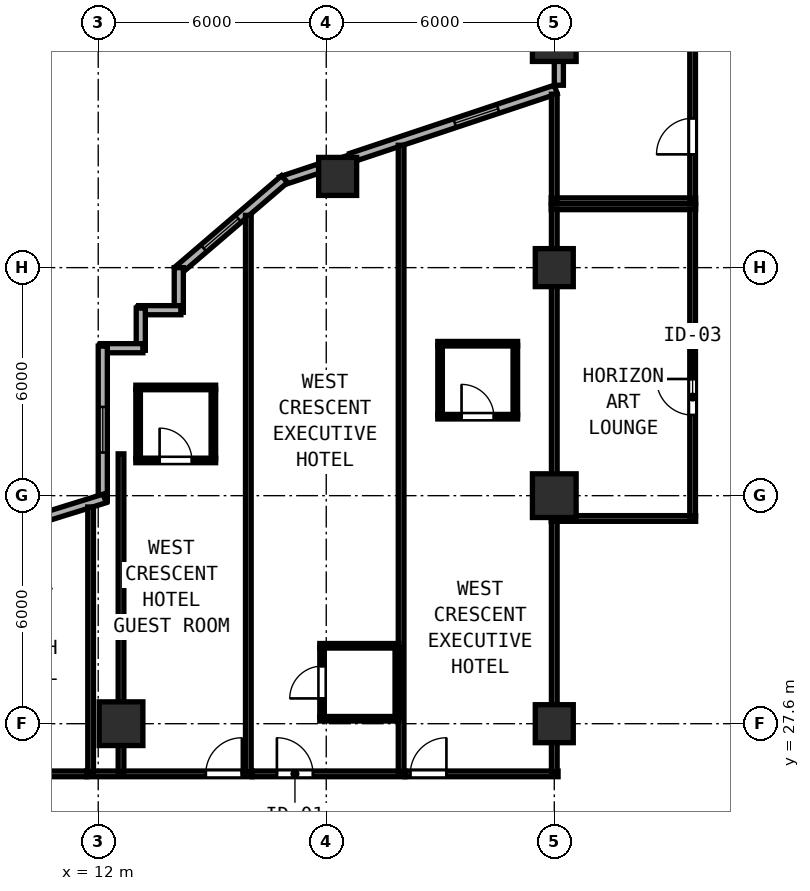
"""IFC4 building model, lengths in metres.
Left out: names, types, materials, properties, quantities, classifications, styles, units other than length and angle.
Written with IfcOpenShell. Run it as: python <this file> out.ifc"""

import sys

from ifc_helpers import new_model, si_unit, direction, frame, frame_2d, origin, origin_2d, place, context, subcontext, project, spatial, rectangle, hollow_rectangle, extrude, element, fill, save


model = new_model("IFC4")
c1 = context("Model", 3, precision=1e-05, world=origin(), true_north=direction((0.0, 1.0)))
c2 = subcontext(c1, "Body", "Model", "MODEL_VIEW")
j1 = project(units=[si_unit("LENGTHUNIT", "METRE"), si_unit("PLANEANGLEUNIT", "RADIAN")], contexts=[c1])
p1 = place(None, origin())
s1 = spatial("IfcSite", under=j1, at=p1, CompositionType="ELEMENT")
p2 = place(p1, origin())
s2 = spatial("IfcBuilding", under=s1, at=p2, CompositionType="ELEMENT")
p3 = place(p2, frame((0.0, 0.0, 47.6)))
s3 = spatial("IfcBuildingStorey", under=s2, at=p3, CompositionType="ELEMENT", Elevation=47.6)
for number, where, z_axis, x_axis in (
    (1, (24.0, 33.6, 0.0), (0.0, 0.0, 1.0), (1.0, 0.0, 0.0)),
    (2, (24.0, 45.6, 0.0), (0.0, 0.0, 1.0), (1.0, 0.0, 0.0)),
    (3, (12.6, 27.6, 0.0), (0.0, 0.0, 1.0), (1.0, 0.0, 0.0)),
):
    element("IfcColumn", number, at=place(p3, frame(where, z_axis=z_axis, x_axis=x_axis)), inside=s3, PredefinedType="COLUMN", context=c2, shape_type="SweptSolid", body=[
        extrude(hollow_rectangle(XDim=1.15, YDim=1.15, WallThickness=0.042, at=origin_2d()), origin(), (0.0, 0.0, 1.0), 3.8),
    ])
for number, where, z_axis, x_axis in (
    (4, (24.0, 27.6, 0.0), (0.0, 0.0, 1.0), (1.0, 0.0, 0.0)),
    (5, (24.0, 39.6, 0.0), (0.0, 0.0, 1.0), (1.0, 0.0, 0.0)),
    (6, (18.3, 42.0, 0.0), (0.0, 0.0, 1.0), (1.0, 0.0, 0.0)),
):
    element("IfcColumn", number, at=place(p3, frame(where, z_axis=z_axis, x_axis=x_axis)), inside=s3, PredefinedType="COLUMN", context=c2, shape_type="SweptSolid", body=[
        extrude(hollow_rectangle(XDim=1.0, YDim=1.0, WallThickness=0.038, at=origin_2d()), origin(), (0.0, 0.0, 1.0), 3.8),
    ])
p4 = place(p3, frame((24.12, 45.033, 0.0), z_axis=(0.0, 0.0, 1.0), x_axis=(0.0, -1.0, 0.0)))
e7 = element("IfcWall", 7, at=p4, inside=s3, PredefinedType="SOLIDWALL", context=c2, shape_type="SweptSolid", body=[
    extrude(rectangle(XDim=0.635, YDim=0.24, at=frame_2d((0.317, 0.0))), origin(), (0.0, 0.0, 1.0), 3.097),
])
p5 = place(p3, frame((24.039, 44.287, 0.0), z_axis=(0.0, 0.0, 1.0), x_axis=(-0.948678995954, -0.316240672014, 0.0)))
e8 = element("IfcWall", 8, at=p5, inside=s3, PredefinedType="SOLIDWALL", context=c2, shape_type="SweptSolid", body=[
    extrude(rectangle(XDim=5.675, YDim=0.24, at=frame_2d((2.837, 0.0))), origin(), (0.0, 0.0, 1.0), 3.097),
])
p6 = place(p5, frame((1.6, 0.0, 0.85)))
e9 = element("IfcOpeningElement", 9, at=p6, cuts=e8, PredefinedType="OPENING", context=c2, shape_type="SweptSolid", body=[
    extrude(rectangle(XDim=1.2, YDim=1.85, at=frame_2d((0.6, 0.925))), frame((0.0, 0.13, 0.0), z_axis=(0.0, -1.0, 0.0), x_axis=(1.0, 0.0, 0.0)), (0.0, 0.0, 1.0), 0.26),
])
p7 = place(p3, frame((17.808, 42.209, 0.0), z_axis=(0.0, 0.0, 1.0), x_axis=(-0.948706457285, -0.316158279832, 0.0)))
e10 = element("IfcWall", 10, at=p7, inside=s3, PredefinedType="SOLIDWALL", context=c2, shape_type="SweptSolid", body=[
    extrude(rectangle(XDim=1.054, YDim=0.24, at=frame_2d((0.527, 0.0))), origin(), (0.0, 0.0, 1.0), 3.6),
])
p8 = place(p3, frame((16.902, 41.929, 0.0), z_axis=(0.0, 0.0, 1.0), x_axis=(-0.759275136126, -0.650769750112, 0.0)))
e11 = element("IfcWall", 11, at=p8, inside=s3, PredefinedType="SOLIDWALL", context=c2, shape_type="SweptSolid", body=[
    extrude(rectangle(XDim=3.719, YDim=0.24, at=frame_2d((1.86, 0.0))), origin(), (0.0, 0.0, 1.0), 3.6),
])
p9 = place(p8, frame((1.6, 0.0, 0.85)))
e12 = element("IfcOpeningElement", 12, at=p9, cuts=e11, PredefinedType="OPENING", context=c2, shape_type="SweptSolid", body=[
    extrude(rectangle(XDim=1.2, YDim=1.85, at=frame_2d((0.6, 0.925))), frame((0.0, 0.13, 0.0), z_axis=(0.0, -1.0, 0.0), x_axis=(1.0, 0.0, 0.0)), (0.0, 0.0, 1.0), 0.26),
])
p10 = place(p3, frame((14.12, 39.6, 0.0), z_axis=(0.0, 0.0, 1.0), x_axis=(0.0, -1.0, 0.0)))
e13 = element("IfcWall", 13, at=p10, inside=s3, PredefinedType="SOLIDWALL", context=c2, shape_type="SweptSolid", body=[
    extrude(rectangle(XDim=1.175, YDim=0.24, at=frame_2d((0.587, 0.0))), origin(), (0.0, 0.0, 1.0), 3.6),
])
p11 = place(p3, frame((14.175, 38.48, 0.0), z_axis=(0.0, 0.0, 1.0), x_axis=(-1.0, 0.0, 0.0)))
e14 = element("IfcWall", 14, at=p11, inside=s3, PredefinedType="SOLIDWALL", context=c2, shape_type="SweptSolid", body=[
    extrude(rectangle(XDim=1.11, YDim=0.24, at=frame_2d((0.555, 0.0))), origin(), (0.0, 0.0, 1.0), 3.6),
])
p12 = place(p3, frame((13.12, 38.535, 0.0), z_axis=(0.0, 0.0, 1.0), x_axis=(0.0, -1.0, 0.0)))
e15 = element("IfcWall", 15, at=p12, inside=s3, PredefinedType="SOLIDWALL", context=c2, shape_type="SweptSolid", body=[
    extrude(rectangle(XDim=1.11, YDim=0.24, at=frame_2d((0.555, 0.0))), origin(), (0.0, 0.0, 1.0), 3.6),
])
p13 = place(p3, frame((13.175, 37.48, 0.0), z_axis=(0.0, 0.0, 1.0), x_axis=(-1.0, 0.0, 0.0)))
e16 = element("IfcWall", 16, at=p13, inside=s3, PredefinedType="SOLIDWALL", context=c2, shape_type="SweptSolid", body=[
    extrude(rectangle(XDim=1.11, YDim=0.24, at=frame_2d((0.555, 0.0))), origin(), (0.0, 0.0, 1.0), 3.6),
])
p14 = place(p3, frame((12.12, 37.535, 0.0), z_axis=(0.0, 0.0, 1.0), x_axis=(0.0, -1.0, 0.0)))
e17 = element("IfcWall", 17, at=p14, inside=s3, PredefinedType="SOLIDWALL", context=c2, shape_type="SweptSolid", body=[
    extrude(rectangle(XDim=4.078, YDim=0.24, at=frame_2d((2.039, 0.0))), origin(), (0.0, 0.0, 1.0), 3.6),
])
p15 = place(p14, frame((1.6, 0.0, 0.85)))
e18 = element("IfcOpeningElement", 18, at=p15, cuts=e17, PredefinedType="OPENING", context=c2, shape_type="SweptSolid", body=[
    extrude(rectangle(XDim=1.2, YDim=1.85, at=frame_2d((0.6, 0.925))), frame((0.0, 0.13, 0.0), z_axis=(0.0, -1.0, 0.0), x_axis=(1.0, 0.0, 0.0)), (0.0, 0.0, 1.0), 0.26),
])
p16 = place(p3, frame((12.173, 33.528, 0.0), z_axis=(0.0, 0.0, 1.0), x_axis=(-0.954920174609, -0.296862695745, 0.0)))
e19 = element("IfcWall", 19, at=p16, inside=s3, PredefinedType="SOLIDWALL", context=c2, shape_type="SweptSolid", body=[
    extrude(rectangle(XDim=8.25, YDim=0.24, at=frame_2d((4.125, 0.0))), origin(), (0.0, 0.0, 1.0), 3.6),
])
p17 = place(p16, frame((1.6, 0.0, 0.85)))
e20 = element("IfcOpeningElement", 20, at=p17, cuts=e19, PredefinedType="OPENING", context=c2, shape_type="SweptSolid", body=[
    extrude(rectangle(XDim=1.2, YDim=1.85, at=frame_2d((0.6, 0.925))), frame((0.0, 0.13, 0.0), z_axis=(0.0, -1.0, 0.0), x_axis=(1.0, 0.0, 0.0)), (0.0, 0.0, 1.0), 0.26),
])
for number, where, z_axis, x_axis in (
    (21, (23.92, 41.2, 0.0), (0.0, 0.0, 1.0), (1.0, 0.0, 0.0)),
    (22, (23.92, 33.0, 0.0), (0.0, 0.0, 1.0), (1.0, 0.0, 0.0)),
):
    element("IfcWall", number, at=place(p3, frame(where, z_axis=z_axis, x_axis=x_axis)), inside=s3, PredefinedType="PARTITIONING", context=c2, shape_type="SweptSolid", body=[
        extrude(rectangle(XDim=3.8, YDim=0.15, at=frame_2d((1.9, 0.0))), origin(), (0.0, 0.0, 1.0), 3.6),
    ])
p18 = place(p3, frame((24.0, 33.06, 0.0), z_axis=(0.0, 0.0, 1.0), x_axis=(0.0, 1.0, 0.0)))
e23 = element("IfcWall", 23, at=p18, inside=s3, PredefinedType="PARTITIONING", context=c2, shape_type="SweptSolid", body=[
    extrude(rectangle(XDim=8.08, YDim=0.15, at=frame_2d((4.04, 0.0))), origin(), (0.0, 0.0, 1.0), 3.097),
])
p19 = place(p3, frame((27.64, 33.06, 0.0), z_axis=(0.0, 0.0, 1.0), x_axis=(0.0, 1.0, 0.0)))
e24 = element("IfcWall", 24, at=p19, inside=s3, PredefinedType="PARTITIONING", context=c2, shape_type="SweptSolid", body=[
    extrude(rectangle(XDim=8.08, YDim=0.15, at=frame_2d((4.04, 0.0))), origin(), (0.0, 0.0, 1.0), 3.6),
])
p20 = place(p19, frame((3.61, 0.0, 0.0), z_axis=(0.0, 0.0, 1.0), x_axis=(-1.0, 0.0, 0.0)))
e25 = element("IfcOpeningElement", 25, at=p20, cuts=e24, PredefinedType="OPENING", context=c2, shape_type="SweptSolid", body=[
    extrude(rectangle(XDim=0.95, YDim=2.12, at=frame_2d((0.475, 1.06))), frame((0.0, 0.085, 0.0), z_axis=(0.0, -1.0, 0.0), x_axis=(1.0, 0.0, 0.0)), (0.0, 0.0, 1.0), 0.17),
])
p21 = place(p3, frame((23.92, 41.36, 0.0), z_axis=(0.0, 0.0, 1.0), x_axis=(1.0, 0.0, 0.0)))
e26 = element("IfcWall", 26, at=p21, inside=s3, PredefinedType="PARTITIONING", context=c2, shape_type="SweptSolid", body=[
    extrude(rectangle(XDim=3.8, YDim=0.15, at=frame_2d((1.9, 0.0))), origin(), (0.0, 0.0, 1.0), 3.6),
])
p22 = place(p3, frame((24.0, 41.42, 0.0), z_axis=(0.0, 0.0, 1.0), x_axis=(0.0, 1.0, 0.0)))
e27 = element("IfcWall", 27, at=p22, inside=s3, PredefinedType="PARTITIONING", context=c2, shape_type="SweptSolid", body=[
    extrude(rectangle(XDim=2.743, YDim=0.15, at=frame_2d((1.372, 0.0))), origin(), (0.0, 0.0, 1.0), 3.097),
])
p23 = place(p3, frame((27.64, 41.42, 0.0), z_axis=(0.0, 0.0, 1.0), x_axis=(0.0, 1.0, 0.0)))
e28 = element("IfcWall", 28, at=p23, inside=s3, PredefinedType="PARTITIONING", context=c2, shape_type="SweptSolid", body=[
    extrude(rectangle(XDim=4.54, YDim=0.15, at=frame_2d((2.27, 0.0))), origin(), (0.0, 0.0, 1.0), 3.6),
])
p24 = place(p23, frame((2.11, 0.0, 0.0), z_axis=(0.0, 0.0, 1.0), x_axis=(-1.0, 0.0, 0.0)))
e29 = element("IfcOpeningElement", 29, at=p24, cuts=e28, PredefinedType="OPENING", context=c2, shape_type="SweptSolid", body=[
    extrude(rectangle(XDim=0.95, YDim=2.12, at=frame_2d((0.475, 1.06))), frame((0.0, 0.085, 0.0), z_axis=(0.0, -1.0, 0.0), x_axis=(1.0, 0.0, 0.0)), (0.0, 0.0, 1.0), 0.17),
])
p25 = place(p3, frame((11.7, 26.28, 0.0), z_axis=(0.0, 0.0, 1.0), x_axis=(1.0, 0.0, 0.0)))
e30 = element("IfcWall", 30, at=p25, inside=s3, PredefinedType="PARTITIONING", context=c2, shape_type="SweptSolid", body=[
    extrude(rectangle(XDim=4.35, YDim=0.15, at=frame_2d((2.175, 0.0))), origin(), (0.0, 0.0, 1.0), 3.6),
])
p26 = place(p25, frame((3.13, 0.0, 0.0)))
e31 = element("IfcOpeningElement", 31, at=p26, cuts=e30, PredefinedType="OPENING", context=c2, shape_type="SweptSolid", body=[
    extrude(rectangle(XDim=0.95, YDim=2.15, at=frame_2d((0.475, 1.075))), frame((0.0, 0.085, 0.0), z_axis=(0.0, -1.0, 0.0), x_axis=(1.0, 0.0, 0.0)), (0.0, 0.0, 1.0), 0.17),
])
p27 = place(p3, frame((11.8, 26.34, 0.0), z_axis=(0.0, 0.0, 1.0), x_axis=(0.0, 1.0, 0.0)))
e32 = element("IfcWall", 32, at=p27, inside=s3, PredefinedType="PARTITIONING", context=c2, shape_type="SweptSolid", body=[
    extrude(rectangle(XDim=6.962, YDim=0.15, at=frame_2d((3.481, 0.0))), origin(), (0.0, 0.0, 1.0), 3.6),
])
p28 = place(p3, frame((15.95, 26.34, 0.0), z_axis=(0.0, 0.0, 1.0), x_axis=(0.0, 1.0, 0.0)))
e33 = element("IfcWall", 33, at=p28, inside=s3, PredefinedType="PARTITIONING", context=c2, shape_type="SweptSolid", body=[
    extrude(rectangle(XDim=14.635, YDim=0.15, at=frame_2d((7.317, 0.0))), origin(), (0.0, 0.0, 1.0), 3.6),
])
p29 = place(p3, frame((12.99, 36.447, 0.0), z_axis=(0.0, 0.0, 1.0), x_axis=(1.0, 0.0, 0.0)))
e34 = element("IfcWall", 34, at=p29, inside=s3, PredefinedType="PARTITIONING", context=c2, shape_type="SweptSolid", body=[
    extrude(rectangle(XDim=2.1, YDim=0.12, at=frame_2d((1.05, 0.0))), origin(), (0.0, 0.0, 1.0), 3.6),
])
p30 = place(p3, frame((12.99, 34.527, 0.0), z_axis=(0.0, 0.0, 1.0), x_axis=(1.0, 0.0, 0.0)))
e35 = element("IfcWall", 35, at=p30, inside=s3, PredefinedType="PARTITIONING", context=c2, shape_type="SweptSolid", body=[
    extrude(rectangle(XDim=2.1, YDim=0.12, at=frame_2d((1.05, 0.0))), origin(), (0.0, 0.0, 1.0), 3.6),
])
p31 = place(p30, frame((0.625, 0.0, 0.0)))
e36 = element("IfcOpeningElement", 36, at=p31, cuts=e35, PredefinedType="OPENING", context=c2, shape_type="SweptSolid", body=[
    extrude(rectangle(XDim=0.85, YDim=2.1, at=frame_2d((0.425, 1.05))), frame((0.0, 0.07, 0.0), z_axis=(0.0, -1.0, 0.0), x_axis=(1.0, 0.0, 0.0)), (0.0, 0.0, 1.0), 0.14),
])
for number, where, z_axis, x_axis in (
    (37, (13.05, 34.572, 0.0), (0.0, 0.0, 1.0), (0.0, 1.0, 0.0)),
    (38, (15.03, 34.572, 0.0), (0.0, 0.0, 1.0), (0.0, 1.0, 0.0)),
):
    element("IfcWall", number, at=place(p3, frame(where, z_axis=z_axis, x_axis=x_axis)), inside=s3, PredefinedType="PARTITIONING", context=c2, shape_type="SweptSolid", body=[
        extrude(rectangle(XDim=1.83, YDim=0.12, at=frame_2d((0.915, 0.0))), origin(), (0.0, 0.0, 1.0), 3.6),
    ])
p32 = place(p3, frame((16.052, 26.28, 0.0), z_axis=(0.0, 0.0, 1.0), x_axis=(1.0, 0.0, 0.0)))
e39 = element("IfcWall", 39, at=p32, inside=s3, PredefinedType="PARTITIONING", context=c2, shape_type="SweptSolid", body=[
    extrude(rectangle(XDim=4.018, YDim=0.15, at=frame_2d((2.009, 0.0))), origin(), (0.0, 0.0, 1.0), 3.6),
])
p33 = place(p32, frame((0.649, 0.0, 0.0)))
e40 = element("IfcOpeningElement", 40, at=p33, cuts=e39, PredefinedType="OPENING", context=c2, shape_type="SweptSolid", body=[
    extrude(rectangle(XDim=0.95, YDim=2.18, at=frame_2d((0.475, 1.09))), frame((0.0, 0.085, 0.0), z_axis=(0.0, -1.0, 0.0), x_axis=(1.0, 0.0, 0.0)), (0.0, 0.0, 1.0), 0.17),
])
p34 = place(p3, frame((19.97, 26.34, 0.0), z_axis=(0.0, 0.0, 1.0), x_axis=(0.0, 1.0, 0.0)))
e41 = element("IfcWall", 41, at=p34, inside=s3, PredefinedType="PARTITIONING", context=c2, shape_type="SweptSolid", body=[
    extrude(rectangle(XDim=16.479, YDim=0.15, at=frame_2d((8.24, 0.0))), origin(), (0.0, 0.0, 1.0), 3.6),
])
p35 = place(p3, frame((17.83, 29.65, 0.0), z_axis=(0.0, 0.0, 1.0), x_axis=(1.0, 0.0, 0.0)))
e42 = element("IfcWall", 42, at=p35, inside=s3, PredefinedType="PARTITIONING", context=c2, shape_type="SweptSolid", body=[
    extrude(rectangle(XDim=2.08, YDim=0.12, at=frame_2d((1.04, 0.0))), origin(), (0.0, 0.0, 1.0), 3.6),
])
p36 = place(p3, frame((17.83, 27.73, 0.0), z_axis=(0.0, 0.0, 1.0), x_axis=(1.0, 0.0, 0.0)))
e43 = element("IfcWall", 43, at=p36, inside=s3, PredefinedType="PARTITIONING", context=c2, shape_type="SweptSolid", body=[
    extrude(rectangle(XDim=2.08, YDim=0.12, at=frame_2d((1.04, 0.0))), origin(), (0.0, 0.0, 1.0), 3.097),
])
p37 = place(p3, frame((17.89, 27.775, 0.0), z_axis=(0.0, 0.0, 1.0), x_axis=(0.0, 1.0, 0.0)))
e44 = element("IfcWall", 44, at=p37, inside=s3, PredefinedType="PARTITIONING", context=c2, shape_type="SweptSolid", body=[
    extrude(rectangle(XDim=1.83, YDim=0.12, at=frame_2d((0.915, 0.0))), origin(), (0.0, 0.0, 1.0), 3.6),
])
p38 = place(p37, frame((1.34, 0.0, 0.0), z_axis=(0.0, 0.0, 1.0), x_axis=(-1.0, 0.0, 0.0)))
e45 = element("IfcOpeningElement", 45, at=p38, cuts=e44, PredefinedType="OPENING", context=c2, shape_type="SweptSolid", body=[
    extrude(rectangle(XDim=0.85, YDim=2.1, at=frame_2d((0.425, 1.05))), frame((0.0, 0.07, 0.0), z_axis=(0.0, -1.0, 0.0), x_axis=(1.0, 0.0, 0.0)), (0.0, 0.0, 1.0), 0.14),
])
p39 = place(p3, frame((19.87, 27.775, 0.0), z_axis=(0.0, 0.0, 1.0), x_axis=(0.0, 1.0, 0.0)))
e46 = element("IfcWall", 46, at=p39, inside=s3, PredefinedType="PARTITIONING", context=c2, shape_type="SweptSolid", body=[
    extrude(rectangle(XDim=1.83, YDim=0.12, at=frame_2d((0.915, 0.0))), origin(), (0.0, 0.0, 1.0), 3.6),
])
p40 = place(p3, frame((20.072, 26.28, 0.0), z_axis=(0.0, 0.0, 1.0), x_axis=(1.0, 0.0, 0.0)))
e47 = element("IfcWall", 47, at=p40, inside=s3, PredefinedType="PARTITIONING", context=c2, shape_type="SweptSolid", body=[
    extrude(rectangle(XDim=4.028, YDim=0.15, at=frame_2d((2.014, 0.0))), origin(), (0.0, 0.0, 1.0), 3.6),
])
p41 = place(p40, frame((0.14, 0.0, 0.0)))
e48 = element("IfcOpeningElement", 48, at=p41, cuts=e47, PredefinedType="OPENING", context=c2, shape_type="SweptSolid", body=[
    extrude(rectangle(XDim=0.95, YDim=2.18, at=frame_2d((0.475, 1.09))), frame((0.0, 0.085, 0.0), z_axis=(0.0, -1.0, 0.0), x_axis=(1.0, 0.0, 0.0)), (0.0, 0.0, 1.0), 0.17),
])
p42 = place(p3, frame((24.0, 26.34, 0.0), z_axis=(0.0, 0.0, 1.0), x_axis=(0.0, 1.0, 0.0)))
e49 = element("IfcWall", 49, at=p42, inside=s3, PredefinedType="PARTITIONING", context=c2, shape_type="SweptSolid", body=[
    extrude(rectangle(XDim=6.6, YDim=0.15, at=frame_2d((3.3, 0.0))), origin(), (0.0, 0.0, 1.0), 3.097),
])
p43 = place(p3, frame((20.935, 37.598, 0.0), z_axis=(0.0, 0.0, 1.0), x_axis=(1.0, 0.0, 0.0)))
e50 = element("IfcWall", 50, at=p43, inside=s3, PredefinedType="PARTITIONING", context=c2, shape_type="SweptSolid", body=[
    extrude(rectangle(XDim=2.1, YDim=0.12, at=frame_2d((1.05, 0.0))), origin(), (0.0, 0.0, 1.0), 3.6),
])
p44 = place(p3, frame((20.935, 35.678, 0.0), z_axis=(0.0, 0.0, 1.0), x_axis=(1.0, 0.0, 0.0)))
e51 = element("IfcWall", 51, at=p44, inside=s3, PredefinedType="PARTITIONING", context=c2, shape_type="SweptSolid", body=[
    extrude(rectangle(XDim=2.1, YDim=0.12, at=frame_2d((1.05, 0.0))), origin(), (0.0, 0.0, 1.0), 3.6),
])
p45 = place(p44, frame((0.625, 0.0, 0.0)))
e52 = element("IfcOpeningElement", 52, at=p45, cuts=e51, PredefinedType="OPENING", context=c2, shape_type="SweptSolid", body=[
    extrude(rectangle(XDim=0.85, YDim=2.1, at=frame_2d((0.425, 1.05))), frame((0.0, 0.07, 0.0), z_axis=(0.0, -1.0, 0.0), x_axis=(1.0, 0.0, 0.0)), (0.0, 0.0, 1.0), 0.14),
])
for number, where, z_axis, x_axis in (
    (53, (20.995, 35.723, 0.0), (0.0, 0.0, 1.0), (0.0, 1.0, 0.0)),
    (54, (22.975, 35.723, 0.0), (0.0, 0.0, 1.0), (0.0, 1.0, 0.0)),
):
    element("IfcWall", number, at=place(p3, frame(where, z_axis=z_axis, x_axis=x_axis)), inside=s3, PredefinedType="PARTITIONING", context=c2, shape_type="SweptSolid", body=[
        extrude(rectangle(XDim=1.83, YDim=0.12, at=frame_2d((0.915, 0.0))), origin(), (0.0, 0.0, 1.0), 3.6),
    ])
p46 = place(p3, frame((2.305, 26.28, 0.0), z_axis=(0.0, 0.0, 1.0), x_axis=(1.0, 0.0, 0.0)))
e55 = element("IfcWall", 55, at=p46, inside=s3, PredefinedType="PARTITIONING", context=c2, shape_type="SweptSolid", body=[
    extrude(rectangle(XDim=9.393, YDim=0.15, at=frame_2d((4.697, 0.0))), origin(), (0.0, 0.0, 1.0), 3.6),
])
p47 = place(p46, frame((4.827, 0.0, 0.0)))
e56 = element("IfcOpeningElement", 56, at=p47, cuts=e55, PredefinedType="OPENING", context=c2, shape_type="SweptSolid", body=[
    extrude(rectangle(XDim=0.95, YDim=2.15, at=frame_2d((0.475, 1.075))), frame((0.0, 0.085, 0.0), z_axis=(0.0, -1.0, 0.0), x_axis=(1.0, 0.0, 0.0)), (0.0, 0.0, 1.0), 0.17),
])
p48 = place(p3, frame((12.6, 26.34, 0.0), z_axis=(0.0, 0.0, 1.0), x_axis=(0.0, 1.0, 0.0)))
e57 = element("IfcWall", 57, at=p48, inside=s3, PredefinedType="PARTITIONING", context=c2, shape_type="SweptSolid", body=[
    extrude(rectangle(XDim=8.36, YDim=0.15, at=frame_2d((4.18, 0.0))), origin(), (0.0, 0.0, 1.0), 3.097),
])
p49 = place(p6, origin())
e58 = element("IfcWindow", 58, at=p49, inside=s3, PartitioningType="SINGLE_PANEL", PredefinedType="WINDOW", context=c2, shape_type="SweptSolid", body=[
    extrude(rectangle(XDim=1.2, YDim=1.85, at=frame_2d((0.6, 0.925))), frame((0.0, 0.03, 0.0), z_axis=(0.0, -1.0, 0.0), x_axis=(1.0, 0.0, 0.0)), (0.0, 0.0, 1.0), 0.06),
])
fill(e9, e58)
p50 = place(p9, origin())
e59 = element("IfcWindow", 59, at=p50, inside=s3, PartitioningType="SINGLE_PANEL", PredefinedType="WINDOW", context=c2, shape_type="SweptSolid", body=[
    extrude(rectangle(XDim=1.2, YDim=1.85, at=frame_2d((0.6, 0.925))), frame((0.0, 0.03, 0.0), z_axis=(0.0, -1.0, 0.0), x_axis=(1.0, 0.0, 0.0)), (0.0, 0.0, 1.0), 0.06),
])
fill(e12, e59)
p51 = place(p15, origin())
e60 = element("IfcWindow", 60, at=p51, inside=s3, PartitioningType="SINGLE_PANEL", PredefinedType="WINDOW", context=c2, shape_type="SweptSolid", body=[
    extrude(rectangle(XDim=1.2, YDim=1.85, at=frame_2d((0.6, 0.925))), frame((0.0, 0.03, 0.0), z_axis=(0.0, -1.0, 0.0), x_axis=(1.0, 0.0, 0.0)), (0.0, 0.0, 1.0), 0.06),
])
fill(e18, e60)
p52 = place(p20, origin())
e61 = element("IfcDoor", 61, at=p52, inside=s3, OperationType="SINGLE_SWING_LEFT", PredefinedType="DOOR", context=c2, shape_type="SweptSolid", body=[
    extrude(rectangle(XDim=0.95, YDim=2.12, at=frame_2d((0.475, 1.06))), frame((0.0, 0.025, 0.0), z_axis=(0.0, -1.0, 0.0), x_axis=(1.0, 0.0, 0.0)), (0.0, 0.0, 1.0), 0.05),
])
fill(e25, e61)
p53 = place(p24, origin())
e62 = element("IfcDoor", 62, at=p53, inside=s3, OperationType="SINGLE_SWING_RIGHT", PredefinedType="DOOR", context=c2, shape_type="SweptSolid", body=[
    extrude(rectangle(XDim=0.95, YDim=2.12, at=frame_2d((0.475, 1.06))), frame((0.0, 0.025, 0.0), z_axis=(0.0, -1.0, 0.0), x_axis=(1.0, 0.0, 0.0)), (0.0, 0.0, 1.0), 0.05),
])
fill(e29, e62)
p54 = place(p26, origin())
e63 = element("IfcDoor", 63, at=p54, inside=s3, OperationType="SINGLE_SWING_RIGHT", PredefinedType="DOOR", context=c2, shape_type="SweptSolid", body=[
    extrude(rectangle(XDim=0.95, YDim=2.15, at=frame_2d((0.475, 1.075))), frame((0.0, 0.025, 0.0), z_axis=(0.0, -1.0, 0.0), x_axis=(1.0, 0.0, 0.0)), (0.0, 0.0, 1.0), 0.05),
])
fill(e31, e63)
p55 = place(p31, origin())
e64 = element("IfcDoor", 64, at=p55, inside=s3, OperationType="SINGLE_SWING_LEFT", PredefinedType="DOOR", context=c2, shape_type="SweptSolid", body=[
    extrude(rectangle(XDim=0.85, YDim=2.1, at=frame_2d((0.425, 1.05))), frame((0.0, 0.025, 0.0), z_axis=(0.0, -1.0, 0.0), x_axis=(1.0, 0.0, 0.0)), (0.0, 0.0, 1.0), 0.05),
])
fill(e36, e64)
p56 = place(p33, origin())
e65 = element("IfcDoor", 65, at=p56, inside=s3, OperationType="SINGLE_SWING_LEFT", PredefinedType="DOOR", context=c2, shape_type="SweptSolid", body=[
    extrude(rectangle(XDim=0.95, YDim=2.18, at=frame_2d((0.475, 1.09))), frame((0.0, 0.025, 0.0), z_axis=(0.0, -1.0, 0.0), x_axis=(1.0, 0.0, 0.0)), (0.0, 0.0, 1.0), 0.05),
])
fill(e40, e65)
p57 = place(p38, origin())
e66 = element("IfcDoor", 66, at=p57, inside=s3, OperationType="SINGLE_SWING_RIGHT", PredefinedType="DOOR", context=c2, shape_type="SweptSolid", body=[
    extrude(rectangle(XDim=0.85, YDim=2.1, at=frame_2d((0.425, 1.05))), frame((0.0, 0.025, 0.0), z_axis=(0.0, -1.0, 0.0), x_axis=(1.0, 0.0, 0.0)), (0.0, 0.0, 1.0), 0.05),
])
fill(e45, e66)
p58 = place(p41, origin())
e67 = element("IfcDoor", 67, at=p58, inside=s3, OperationType="SINGLE_SWING_RIGHT", PredefinedType="DOOR", context=c2, shape_type="SweptSolid", body=[
    extrude(rectangle(XDim=0.95, YDim=2.18, at=frame_2d((0.475, 1.09))), frame((0.0, 0.025, 0.0), z_axis=(0.0, -1.0, 0.0), x_axis=(1.0, 0.0, 0.0)), (0.0, 0.0, 1.0), 0.05),
])
fill(e48, e67)
p59 = place(p45, origin())
e68 = element("IfcDoor", 68, at=p59, inside=s3, OperationType="SINGLE_SWING_LEFT", PredefinedType="DOOR", context=c2, shape_type="SweptSolid", body=[
    extrude(rectangle(XDim=0.85, YDim=2.1, at=frame_2d((0.425, 1.05))), frame((0.0, 0.025, 0.0), z_axis=(0.0, -1.0, 0.0), x_axis=(1.0, 0.0, 0.0)), (0.0, 0.0, 1.0), 0.05),
])
fill(e52, e68)
save(model, sys.argv[1])
